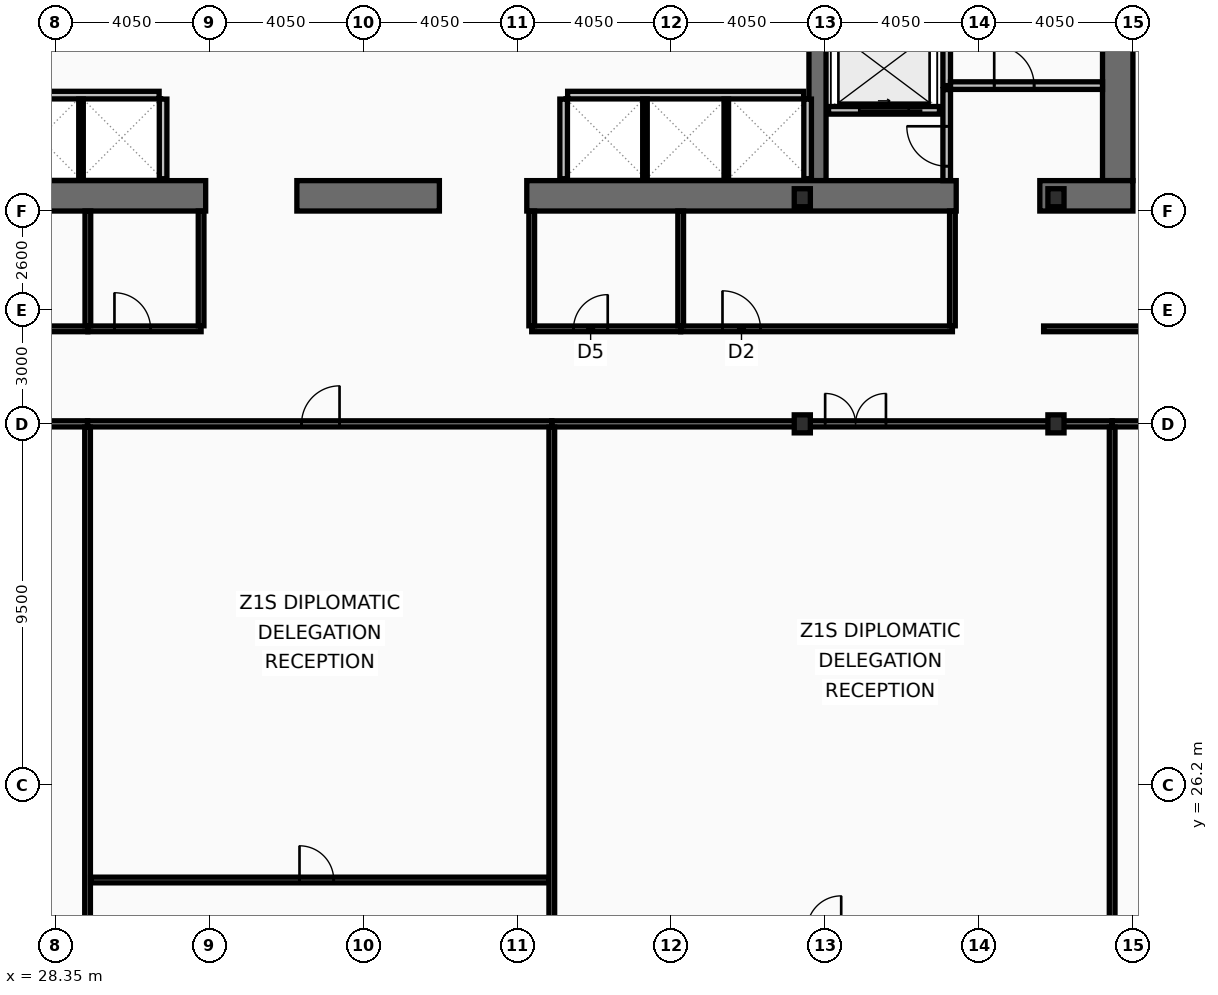
"""IFC4 building model, lengths in metres.
Left out: names, types, materials, properties, quantities, classifications, styles, units other than length and angle.
Written with IfcOpenShell. Run it as: python <this file> out.ifc"""

import sys

from ifc_helpers import new_model, si_unit, direction, frame, frame_2d, origin, origin_2d, place, context, subcontext, project, spatial, rectangle, i_section, extrude, element, fill, save


model = new_model("IFC4")
c1 = context("Model", 3, precision=1e-05, world=origin(), true_north=direction((0.0, 1.0)))
c2 = subcontext(c1, "Body", "Model", "MODEL_VIEW")
j1 = project(units=[si_unit("LENGTHUNIT", "METRE"), si_unit("PLANEANGLEUNIT", "RADIAN")], contexts=[c1])
p1 = place(None, origin())
s1 = spatial("IfcSite", under=j1, at=p1, CompositionType="ELEMENT")
p2 = place(p1, origin())
s2 = spatial("IfcBuilding", under=s1, at=p2, CompositionType="ELEMENT")
p3 = place(p2, frame((0.0, 0.0, 69.8)))
s3 = spatial("IfcBuildingStorey", under=s2, at=p3, CompositionType="ELEMENT", Elevation=69.8)
p4 = place(p3, frame((56.3, 52.9, 0.0), z_axis=(0.0, 0.0, 1.0), x_axis=(0.0, -1.0, 0.0)))
e1 = element("IfcWall", 1, at=p4, inside=s3, PredefinedType="SHEAR", context=c2, shape_type="SweptSolid", body=[
    extrude(rectangle(XDim=10.8, YDim=0.8, at=frame_2d((5.4, 0.0))), origin(), (0.0, 0.0, 1.0), 3.82),
])
p5 = place(p3, frame((48.4, 42.1, 0.0), z_axis=(0.0, 0.0, 1.0), x_axis=(0.0, 1.0, 0.0)))
e2 = element("IfcWall", 2, at=p5, inside=s3, PredefinedType="SHEAR", context=c2, shape_type="SweptSolid", body=[
    extrude(rectangle(XDim=10.8, YDim=0.45, at=frame_2d((5.4, 0.0))), origin(), (0.0, 0.0, 1.0), 3.82),
])
p6 = place(p3, frame((32.3, 41.7, 0.0), z_axis=(0.0, 0.0, 1.0), x_axis=(-1.0, 0.0, 0.0)))
e3 = element("IfcWall", 3, at=p6, inside=s3, PredefinedType="SHEAR", context=c2, shape_type="SweptSolid", body=[
    extrude(rectangle(XDim=11.45, YDim=0.8, at=frame_2d((5.725, 0.0))), origin(), (0.0, 0.0, 1.0), 3.82),
])
p7 = place(p3, frame((38.45, 41.7, 0.0), z_axis=(0.0, 0.0, 1.0), x_axis=(-1.0, 0.0, 0.0)))
e4 = element("IfcWall", 4, at=p7, inside=s3, PredefinedType="SHEAR", context=c2, shape_type="SweptSolid", body=[
    extrude(rectangle(XDim=3.75, YDim=0.8, at=frame_2d((1.875, 0.0))), origin(), (0.0, 0.0, 1.0), 3.82),
])
p8 = place(p3, frame((52.05, 41.7, 0.0), z_axis=(0.0, 0.0, 1.0), x_axis=(-1.0, 0.0, 0.0)))
e5 = element("IfcWall", 5, at=p8, inside=s3, PredefinedType="SHEAR", context=c2, shape_type="SweptSolid", body=[
    extrude(rectangle(XDim=11.3, YDim=0.8, at=frame_2d((5.65, 0.0))), origin(), (0.0, 0.0, 1.0), 3.82),
])
p9 = place(p3, frame((56.7, 41.7, 0.0), z_axis=(0.0, 0.0, 1.0), x_axis=(-1.0, 0.0, 0.0)))
e6 = element("IfcWall", 6, at=p9, inside=s3, PredefinedType="SHEAR", context=c2, shape_type="SweptSolid", body=[
    extrude(rectangle(XDim=2.45, YDim=0.8, at=frame_2d((1.225, 0.0))), origin(), (0.0, 0.0, 1.0), 3.82),
])
for number, where, z_axis, x_axis in (
    (7, (48.0, 35.7, 0.0), (0.0, 0.0, 1.0), (1.0, 0.0, 0.0)),
    (8, (48.0, 41.65, 0.0), (0.0, 0.0, 1.0), (1.0, 0.0, 0.0)),
    (9, (54.675, 35.7, 0.0), (0.0, 0.0, 1.0), (1.0, 0.0, 0.0)),
    (10, (54.675, 41.65, 0.0), (0.0, 0.0, 1.0), (1.0, 0.0, 0.0)),
):
    element("IfcColumn", number, at=place(p3, frame(where, z_axis=z_axis, x_axis=x_axis)), inside=s3, PredefinedType="COLUMN", context=c2, shape_type="SweptSolid", body=[
        extrude(i_section(OverallWidth=0.424, OverallDepth=0.474, WebThickness=0.048, FlangeThickness=0.077, at=origin_2d()), origin(), (0.0, 0.0, 1.0), 4.0),
    ])
p10 = place(p3, frame((51.61, 43.95, 0.0), z_axis=(0.0, 0.0, 1.0), x_axis=(-1.0, 0.0, 0.0)))
e11 = element("IfcWall", 11, at=p10, inside=s3, PredefinedType="PARTITIONING", context=c2, shape_type="SweptSolid", body=[
    extrude(rectangle(XDim=2.92, YDim=0.2, at=frame_2d((1.46, 0.0))), origin(), (0.0, 0.0, 1.0), 3.82),
])
p11 = place(p10, frame((0.81, 0.0, 0.0)))
e12 = element("IfcOpeningElement", 12, at=p11, cuts=e11, PredefinedType="OPENING", context=c2, shape_type="SweptSolid", body=[
    extrude(rectangle(XDim=1.3, YDim=2.18, at=frame_2d((0.65, 1.09))), frame((0.0, 0.11, 0.0), z_axis=(0.0, -1.0, 0.0), x_axis=(1.0, 0.0, 0.0)), (0.0, 0.0, 1.0), 0.22),
])
p12 = place(p3, frame((51.8, 44.6, 0.0), z_axis=(0.0, 0.0, 1.0), x_axis=(0.0, 1.0, 0.0)))
e13 = element("IfcWall", 13, at=p12, inside=s3, PredefinedType="PARTITIONING", context=c2, shape_type="SweptSolid", body=[
    extrude(rectangle(XDim=4.3, YDim=0.2, at=frame_2d((2.15, 0.0))), origin(), (0.0, 0.0, 1.0), 3.82),
])
p13 = place(p3, frame((51.9, 44.6, 0.0), z_axis=(0.0, 0.0, 1.0), x_axis=(1.0, 0.0, 0.0)))
e14 = element("IfcWall", 14, at=p13, inside=s3, PredefinedType="PARTITIONING", context=c2, shape_type="SweptSolid", body=[
    extrude(rectangle(XDim=4.0, YDim=0.2, at=frame_2d((2.0, 0.0))), origin(), (0.0, 0.0, 1.0), 3.82),
])
p14 = place(p13, frame((1.15, 0.0, 0.0)))
e15 = element("IfcOpeningElement", 15, at=p14, cuts=e14, PredefinedType="OPENING", context=c2, shape_type="SweptSolid", body=[
    extrude(rectangle(XDim=1.05, YDim=2.15, at=frame_2d((0.525, 1.075))), frame((0.0, 0.11, 0.0), z_axis=(0.0, -1.0, 0.0), x_axis=(1.0, 0.0, 0.0)), (0.0, 0.0, 1.0), 0.22),
])
p15 = place(p3, frame((51.8, 42.1, 0.0), z_axis=(0.0, 0.0, 1.0), x_axis=(0.0, 1.0, 0.0)))
e16 = element("IfcWall", 16, at=p15, inside=s3, PredefinedType="PARTITIONING", context=c2, shape_type="SweptSolid", body=[
    extrude(rectangle(XDim=2.395, YDim=0.2, at=frame_2d((1.198, 0.0))), origin(), (0.0, 0.0, 1.0), 3.82),
])
p16 = place(p15, frame((0.38, 0.0, 0.0)))
e17 = element("IfcOpeningElement", 17, at=p16, cuts=e16, PredefinedType="OPENING", context=c2, shape_type="SweptSolid", body=[
    extrude(rectangle(XDim=1.05, YDim=2.15, at=frame_2d((0.525, 1.075))), frame((0.0, 0.11, 0.0), z_axis=(0.0, -1.0, 0.0), x_axis=(1.0, 0.0, 0.0)), (0.0, 0.0, 1.0), 0.22),
])
p17 = place(p3, frame((24.805, 44.35, 0.0), z_axis=(0.0, 0.0, 1.0), x_axis=(1.0, 0.0, 0.0)))
e18 = element("IfcWall", 18, at=p17, inside=s3, PredefinedType="PARTITIONING", context=c2, shape_type="SweptSolid", body=[
    extrude(rectangle(XDim=6.27, YDim=0.2, at=frame_2d((3.135, 0.0))), origin(), (0.0, 0.0, 1.0), 3.82),
])
p18 = place(p3, frame((31.18, 42.15, 0.0), z_axis=(0.0, 0.0, 1.0), x_axis=(0.0, 1.0, 0.0)))
e19 = element("IfcWall", 19, at=p18, inside=s3, PredefinedType="PARTITIONING", context=c2, shape_type="SweptSolid", body=[
    extrude(rectangle(XDim=2.095, YDim=0.2, at=frame_2d((1.048, 0.0))), origin(), (0.0, 0.0, 1.0), 3.82),
])
p19 = place(p3, frame((29.02, 42.15, 0.0), z_axis=(0.0, 0.0, 1.0), x_axis=(0.0, 1.0, 0.0)))
e20 = element("IfcWall", 20, at=p19, inside=s3, PredefinedType="PARTITIONING", context=c2, shape_type="SweptSolid", body=[
    extrude(rectangle(XDim=2.095, YDim=0.12, at=frame_2d((1.048, 0.0))), origin(), (0.0, 0.0, 1.0), 3.82),
])
p20 = place(p3, frame((41.825, 44.35, 0.0), z_axis=(0.0, 0.0, 1.0), x_axis=(1.0, 0.0, 0.0)))
e21 = element("IfcWall", 21, at=p20, inside=s3, PredefinedType="PARTITIONING", context=c2, shape_type="SweptSolid", body=[
    extrude(rectangle(XDim=6.21, YDim=0.2, at=frame_2d((3.105, 0.0))), origin(), (0.0, 0.0, 1.0), 3.82),
])
for number, where, z_axis, x_axis in (
    (22, (41.72, 42.15, 0.0), (0.0, 0.0, 1.0), (0.0, 1.0, 0.0)),
    (23, (48.14, 42.15, 0.0), (0.0, 0.0, 1.0), (0.0, 1.0, 0.0)),
):
    element("IfcWall", number, at=place(p3, frame(where, z_axis=z_axis, x_axis=x_axis)), inside=s3, PredefinedType="PARTITIONING", context=c2, shape_type="SweptSolid", body=[
        extrude(rectangle(XDim=2.095, YDim=0.2, at=frame_2d((1.048, 0.0))), origin(), (0.0, 0.0, 1.0), 3.82),
    ])
for number, where, z_axis, x_axis in (
    (24, (43.86, 42.15, 0.0), (0.0, 0.0, 1.0), (0.0, 1.0, 0.0)),
    (25, (46.0, 42.15, 0.0), (0.0, 0.0, 1.0), (0.0, 1.0, 0.0)),
):
    element("IfcWall", number, at=place(p3, frame(where, z_axis=z_axis, x_axis=x_axis)), inside=s3, PredefinedType="PARTITIONING", context=c2, shape_type="SweptSolid", body=[
        extrude(rectangle(XDim=2.095, YDim=0.12, at=frame_2d((1.048, 0.0))), origin(), (0.0, 0.0, 1.0), 3.82),
    ])
p21 = place(p3, frame((24.7, 38.2, 0.0), z_axis=(0.0, 0.0, 1.0), x_axis=(1.0, 0.0, 0.0)))
e26 = element("IfcWall", 26, at=p21, inside=s3, PredefinedType="PARTITIONING", context=c2, shape_type="SweptSolid", body=[
    extrude(rectangle(XDim=4.5, YDim=0.15, at=frame_2d((2.25, 0.0))), origin(), (0.0, 0.0, 1.0), 3.01),
])
p22 = place(p21, frame((0.9, 0.0, 0.0)))
e27 = element("IfcOpeningElement", 27, at=p22, cuts=e26, PredefinedType="OPENING", context=c2, shape_type="SweptSolid", body=[
    extrude(rectangle(XDim=0.95, YDim=2.05, at=frame_2d((0.475, 1.025))), frame((0.0, 0.085, 0.0), z_axis=(0.0, -1.0, 0.0), x_axis=(1.0, 0.0, 0.0)), (0.0, 0.0, 1.0), 0.17),
])
p23 = place(p3, frame((29.2, 38.2, 0.0), z_axis=(0.0, 0.0, 1.0), x_axis=(1.0, 0.0, 0.0)))
e28 = element("IfcWall", 28, at=p23, inside=s3, PredefinedType="PARTITIONING", context=c2, shape_type="SweptSolid", body=[
    extrude(rectangle(XDim=2.98, YDim=0.15, at=frame_2d((1.49, 0.0))), origin(), (0.0, 0.0, 1.0), 3.01),
])
p24 = place(p23, frame((0.7, 0.0, 0.0)))
e29 = element("IfcOpeningElement", 29, at=p24, cuts=e28, PredefinedType="OPENING", context=c2, shape_type="SweptSolid", body=[
    extrude(rectangle(XDim=0.95, YDim=2.05, at=frame_2d((0.475, 1.025))), frame((0.0, 0.085, 0.0), z_axis=(0.0, -1.0, 0.0), x_axis=(1.0, 0.0, 0.0)), (0.0, 0.0, 1.0), 0.17),
])
for number, where, z_axis, x_axis in (
    (30, (29.2, 38.28, 0.0), (0.0, 0.0, 1.0), (0.0, 1.0, 0.0)),
    (31, (32.18, 38.28, 0.0), (0.0, 0.0, 1.0), (0.0, 1.0, 0.0)),
):
    element("IfcWall", number, at=place(p3, frame(where, z_axis=z_axis, x_axis=x_axis)), inside=s3, PredefinedType="PARTITIONING", context=c2, shape_type="SweptSolid", body=[
        extrude(rectangle(XDim=3.02, YDim=0.15, at=frame_2d((1.51, 0.0))), origin(), (0.0, 0.0, 1.0), 3.82),
    ])
p25 = place(p3, frame((40.88, 38.2, 0.0), z_axis=(0.0, 0.0, 1.0), x_axis=(1.0, 0.0, 0.0)))
e32 = element("IfcWall", 32, at=p25, inside=s3, PredefinedType="PARTITIONING", context=c2, shape_type="SweptSolid", body=[
    extrude(rectangle(XDim=3.92, YDim=0.15, at=frame_2d((1.96, 0.0))), origin(), (0.0, 0.0, 1.0), 3.01),
])
p26 = place(p25, frame((1.1, 0.0, 0.0)))
e33 = element("IfcOpeningElement", 33, at=p26, cuts=e32, PredefinedType="OPENING", context=c2, shape_type="SweptSolid", body=[
    extrude(rectangle(XDim=0.9, YDim=2.05, at=frame_2d((0.45, 1.025))), frame((0.0, 0.085, 0.0), z_axis=(0.0, -1.0, 0.0), x_axis=(1.0, 0.0, 0.0)), (0.0, 0.0, 1.0), 0.17),
])
p27 = place(p3, frame((44.8, 38.2, 0.0), z_axis=(0.0, 0.0, 1.0), x_axis=(1.0, 0.0, 0.0)))
e34 = element("IfcWall", 34, at=p27, inside=s3, PredefinedType="PARTITIONING", context=c2, shape_type="SweptSolid", body=[
    extrude(rectangle(XDim=7.15, YDim=0.15, at=frame_2d((3.575, 0.0))), origin(), (0.0, 0.0, 1.0), 3.01),
])
p28 = place(p27, frame((1.1, 0.0, 0.0)))
e35 = element("IfcOpeningElement", 35, at=p28, cuts=e34, PredefinedType="OPENING", context=c2, shape_type="SweptSolid", body=[
    extrude(rectangle(XDim=1.0, YDim=2.05, at=frame_2d((0.5, 1.025))), frame((0.0, 0.085, 0.0), z_axis=(0.0, -1.0, 0.0), x_axis=(1.0, 0.0, 0.0)), (0.0, 0.0, 1.0), 0.17),
])
for number, where, z_axis, x_axis in (
    (36, (40.88, 38.28, 0.0), (0.0, 0.0, 1.0), (0.0, 1.0, 0.0)),
    (37, (44.8, 38.28, 0.0), (0.0, 0.0, 1.0), (0.0, 1.0, 0.0)),
    (38, (51.95, 38.28, 0.0), (0.0, 0.0, 1.0), (0.0, 1.0, 0.0)),
):
    element("IfcWall", number, at=place(p3, frame(where, z_axis=z_axis, x_axis=x_axis)), inside=s3, PredefinedType="PARTITIONING", context=c2, shape_type="SweptSolid", body=[
        extrude(rectangle(XDim=3.02, YDim=0.15, at=frame_2d((1.51, 0.0))), origin(), (0.0, 0.0, 1.0), 3.82),
    ])
p29 = place(p3, frame((54.35, 38.2, 0.0), z_axis=(0.0, 0.0, 1.0), x_axis=(1.0, 0.0, 0.0)))
e39 = element("IfcWall", 39, at=p29, inside=s3, PredefinedType="PARTITIONING", context=c2, shape_type="SweptSolid", body=[
    extrude(rectangle(XDim=16.52, YDim=0.15, at=frame_2d((8.26, 0.0))), origin(), (0.0, 0.0, 1.0), 3.01),
])
p30 = place(p29, frame((3.25, 0.0, 0.0)))
e40 = element("IfcOpeningElement", 40, at=p30, cuts=e39, PredefinedType="OPENING", context=c2, shape_type="SweptSolid", body=[
    extrude(rectangle(XDim=0.95, YDim=2.05, at=frame_2d((0.475, 1.025))), frame((0.0, 0.085, 0.0), z_axis=(0.0, -1.0, 0.0), x_axis=(1.0, 0.0, 0.0)), (0.0, 0.0, 1.0), 0.17),
])
p31 = place(p3, frame((18.069, 35.7, 0.0), z_axis=(0.0, 0.0, 1.0), x_axis=(1.0, 0.0, 0.0)))
e41 = element("IfcWall", 41, at=p31, inside=s3, PredefinedType="PARTITIONING", context=c2, shape_type="SweptSolid", body=[
    extrude(rectangle(XDim=11.124, YDim=0.16, at=frame_2d((5.562, 0.0))), origin(), (0.0, 0.0, 1.0), 3.01),
])
p32 = place(p31, frame((5.172, 0.0, 0.0)))
e42 = element("IfcOpeningElement", 42, at=p32, cuts=e41, PredefinedType="OPENING", context=c2, shape_type="SweptSolid", body=[
    extrude(rectangle(XDim=1.0, YDim=2.05, at=frame_2d((0.5, 1.025))), frame((0.0, 0.09, 0.0), z_axis=(0.0, -1.0, 0.0), x_axis=(1.0, 0.0, 0.0)), (0.0, 0.0, 1.0), 0.18),
])
p33 = place(p3, frame((29.192, 35.7, 0.0), z_axis=(0.0, 0.0, 1.0), x_axis=(1.0, 0.0, 0.0)))
e43 = element("IfcWall", 43, at=p33, inside=s3, PredefinedType="PARTITIONING", context=c2, shape_type="SweptSolid", body=[
    extrude(rectangle(XDim=12.216, YDim=0.16, at=frame_2d((6.108, 0.0))), origin(), (0.0, 0.0, 1.0), 3.01),
])
p34 = place(p33, frame((5.631, 0.0, 0.0)))
e44 = element("IfcOpeningElement", 44, at=p34, cuts=e43, PredefinedType="OPENING", context=c2, shape_type="SweptSolid", body=[
    extrude(rectangle(XDim=1.0, YDim=2.05, at=frame_2d((0.5, 1.025))), frame((0.0, 0.09, 0.0), z_axis=(0.0, -1.0, 0.0), x_axis=(1.0, 0.0, 0.0)), (0.0, 0.0, 1.0), 0.18),
])
p35 = place(p3, frame((29.192, 10.665, 0.0), z_axis=(0.0, 0.0, 1.0), x_axis=(0.0, 1.0, 0.0)))
e45 = element("IfcWall", 45, at=p35, inside=s3, PredefinedType="PARTITIONING", context=c2, shape_type="SweptSolid", body=[
    extrude(rectangle(XDim=24.95, YDim=0.15, at=frame_2d((12.475, 0.0))), origin(), (0.0, 0.0, 1.0), 3.26),
])
p36 = place(p3, frame((29.272, 23.698, 0.0), z_axis=(0.0, 0.0, 1.0), x_axis=(1.0, 0.0, 0.0)))
e46 = element("IfcWall", 46, at=p36, inside=s3, PredefinedType="PARTITIONING", context=c2, shape_type="SweptSolid", body=[
    extrude(rectangle(XDim=12.056, YDim=0.15, at=frame_2d((6.028, 0.0))), origin(), (0.0, 0.0, 1.0), 3.01),
])
p37 = place(p36, frame((5.497, 0.0, 0.0)))
e47 = element("IfcOpeningElement", 47, at=p37, cuts=e46, PredefinedType="OPENING", context=c2, shape_type="SweptSolid", body=[
    extrude(rectangle(XDim=0.9, YDim=2.05, at=frame_2d((0.45, 1.025))), frame((0.0, 0.085, 0.0), z_axis=(0.0, -1.0, 0.0), x_axis=(1.0, 0.0, 0.0)), (0.0, 0.0, 1.0), 0.17),
])
p38 = place(p3, frame((41.408, 35.7, 0.0), z_axis=(0.0, 0.0, 1.0), x_axis=(1.0, 0.0, 0.0)))
e48 = element("IfcWall", 48, at=p38, inside=s3, PredefinedType="PARTITIONING", context=c2, shape_type="SweptSolid", body=[
    extrude(rectangle(XDim=14.745, YDim=0.16, at=frame_2d((7.373, 0.0))), origin(), (0.0, 0.0, 1.0), 3.01),
])
p39 = place(p38, frame((7.193, 0.0, 0.0)))
e49 = element("IfcOpeningElement", 49, at=p39, cuts=e48, PredefinedType="OPENING", context=c2, shape_type="SweptSolid", body=[
    extrude(rectangle(XDim=1.6, YDim=2.15, at=frame_2d((0.8, 1.075))), frame((0.0, 0.09, 0.0), z_axis=(0.0, -1.0, 0.0), x_axis=(1.0, 0.0, 0.0)), (0.0, 0.0, 1.0), 0.18),
])
p40 = place(p3, frame((41.408, 10.665, 0.0), z_axis=(0.0, 0.0, 1.0), x_axis=(0.0, 1.0, 0.0)))
e50 = element("IfcWall", 50, at=p40, inside=s3, PredefinedType="PARTITIONING", context=c2, shape_type="SweptSolid", body=[
    extrude(rectangle(XDim=24.95, YDim=0.15, at=frame_2d((12.475, 0.0))), origin(), (0.0, 0.0, 1.0), 3.26),
])
p41 = place(p3, frame((56.154, 35.7, 0.0), z_axis=(0.0, 0.0, 1.0), x_axis=(1.0, 0.0, 0.0)))
e51 = element("IfcWall", 51, at=p41, inside=s3, PredefinedType="PARTITIONING", context=c2, shape_type="SweptSolid", body=[
    extrude(rectangle(XDim=14.717, YDim=0.16, at=frame_2d((7.358, 0.0))), origin(), (0.0, 0.0, 1.0), 3.01),
])
p42 = place(p41, frame((6.681, 0.0, 0.0)))
e52 = element("IfcOpeningElement", 52, at=p42, cuts=e51, PredefinedType="OPENING", context=c2, shape_type="SweptSolid", body=[
    extrude(rectangle(XDim=1.6, YDim=2.15, at=frame_2d((0.8, 1.075))), frame((0.0, 0.09, 0.0), z_axis=(0.0, -1.0, 0.0), x_axis=(1.0, 0.0, 0.0)), (0.0, 0.0, 1.0), 0.18),
])
p43 = place(p3, frame((56.154, 10.665, 0.0), z_axis=(0.0, 0.0, 1.0), x_axis=(0.0, 1.0, 0.0)))
e53 = element("IfcWall", 53, at=p43, inside=s3, PredefinedType="PARTITIONING", context=c2, shape_type="SweptSolid", body=[
    extrude(rectangle(XDim=24.95, YDim=0.15, at=frame_2d((12.475, 0.0))), origin(), (0.0, 0.0, 1.0), 3.01),
])
p44 = place(p11, origin())
e54 = element("IfcDoor", 54, at=p44, inside=s3, OperationType="SLIDING_TO_LEFT", PredefinedType="DOOR", context=c2, shape_type="SweptSolid", body=[
    extrude(rectangle(XDim=1.3, YDim=2.18, at=frame_2d((0.65, 1.09))), frame((0.0, 0.025, 0.0), z_axis=(0.0, -1.0, 0.0), x_axis=(1.0, 0.0, 0.0)), (0.0, 0.0, 1.0), 0.05),
])
fill(e12, e54)
p45 = place(p14, origin())
e55 = element("IfcDoor", 55, at=p45, inside=s3, OperationType="SINGLE_SWING_LEFT", PredefinedType="DOOR", context=c2, shape_type="SweptSolid", body=[
    extrude(rectangle(XDim=1.05, YDim=2.15, at=frame_2d((0.525, 1.075))), frame((0.0, 0.025, 0.0), z_axis=(0.0, -1.0, 0.0), x_axis=(1.0, 0.0, 0.0)), (0.0, 0.0, 1.0), 0.05),
])
fill(e15, e55)
p46 = place(p16, origin())
e56 = element("IfcDoor", 56, at=p46, inside=s3, OperationType="SINGLE_SWING_RIGHT", PredefinedType="DOOR", context=c2, shape_type="SweptSolid", body=[
    extrude(rectangle(XDim=1.05, YDim=2.15, at=frame_2d((0.525, 1.075))), frame((0.0, 0.025, 0.0), z_axis=(0.0, -1.0, 0.0), x_axis=(1.0, 0.0, 0.0)), (0.0, 0.0, 1.0), 0.05),
])
fill(e17, e56)
p47 = place(p24, origin())
e57 = element("IfcDoor", 57, at=p47, inside=s3, OperationType="SINGLE_SWING_LEFT", PredefinedType="DOOR", context=c2, shape_type="SweptSolid", body=[
    extrude(rectangle(XDim=0.95, YDim=2.05, at=frame_2d((0.475, 1.025))), frame((0.0, 0.025, 0.0), z_axis=(0.0, -1.0, 0.0), x_axis=(1.0, 0.0, 0.0)), (0.0, 0.0, 1.0), 0.05),
])
fill(e29, e57)
p48 = place(p26, origin())
e58 = element("IfcDoor", 58, at=p48, inside=s3, OperationType="SINGLE_SWING_RIGHT", PredefinedType="DOOR", context=c2, shape_type="SweptSolid", body=[
    extrude(rectangle(XDim=0.9, YDim=2.05, at=frame_2d((0.45, 1.025))), frame((0.0, 0.025, 0.0), z_axis=(0.0, -1.0, 0.0), x_axis=(1.0, 0.0, 0.0)), (0.0, 0.0, 1.0), 0.05),
])
fill(e33, e58)
p49 = place(p28, origin())
e59 = element("IfcDoor", 59, at=p49, inside=s3, OperationType="SINGLE_SWING_LEFT", PredefinedType="DOOR", context=c2, shape_type="SweptSolid", body=[
    extrude(rectangle(XDim=1.0, YDim=2.05, at=frame_2d((0.5, 1.025))), frame((0.0, 0.025, 0.0), z_axis=(0.0, -1.0, 0.0), x_axis=(1.0, 0.0, 0.0)), (0.0, 0.0, 1.0), 0.05),
])
fill(e35, e59)
p50 = place(p34, origin())
e60 = element("IfcDoor", 60, at=p50, inside=s3, OperationType="SINGLE_SWING_RIGHT", PredefinedType="DOOR", context=c2, shape_type="SweptSolid", body=[
    extrude(rectangle(XDim=1.0, YDim=2.05, at=frame_2d((0.5, 1.025))), frame((0.0, 0.025, 0.0), z_axis=(0.0, -1.0, 0.0), x_axis=(1.0, 0.0, 0.0)), (0.0, 0.0, 1.0), 0.05),
])
fill(e44, e60)
p51 = place(p37, origin())
e61 = element("IfcDoor", 61, at=p51, inside=s3, OperationType="SINGLE_SWING_LEFT", PredefinedType="DOOR", context=c2, shape_type="SweptSolid", body=[
    extrude(rectangle(XDim=0.9, YDim=2.05, at=frame_2d((0.45, 1.025))), frame((0.0, 0.025, 0.0), z_axis=(0.0, -1.0, 0.0), x_axis=(1.0, 0.0, 0.0)), (0.0, 0.0, 1.0), 0.05),
])
fill(e47, e61)
p52 = place(p39, origin())
e62 = element("IfcDoor", 62, at=p52, inside=s3, OperationType="DOUBLE_DOOR_SINGLE_SWING", PredefinedType="DOOR", context=c2, shape_type="SweptSolid", body=[
    extrude(rectangle(XDim=1.6, YDim=2.15, at=frame_2d((0.8, 1.075))), frame((0.0, 0.025, 0.0), z_axis=(0.0, -1.0, 0.0), x_axis=(1.0, 0.0, 0.0)), (0.0, 0.0, 1.0), 0.05),
])
fill(e49, e62)
save(model, sys.argv[1])
